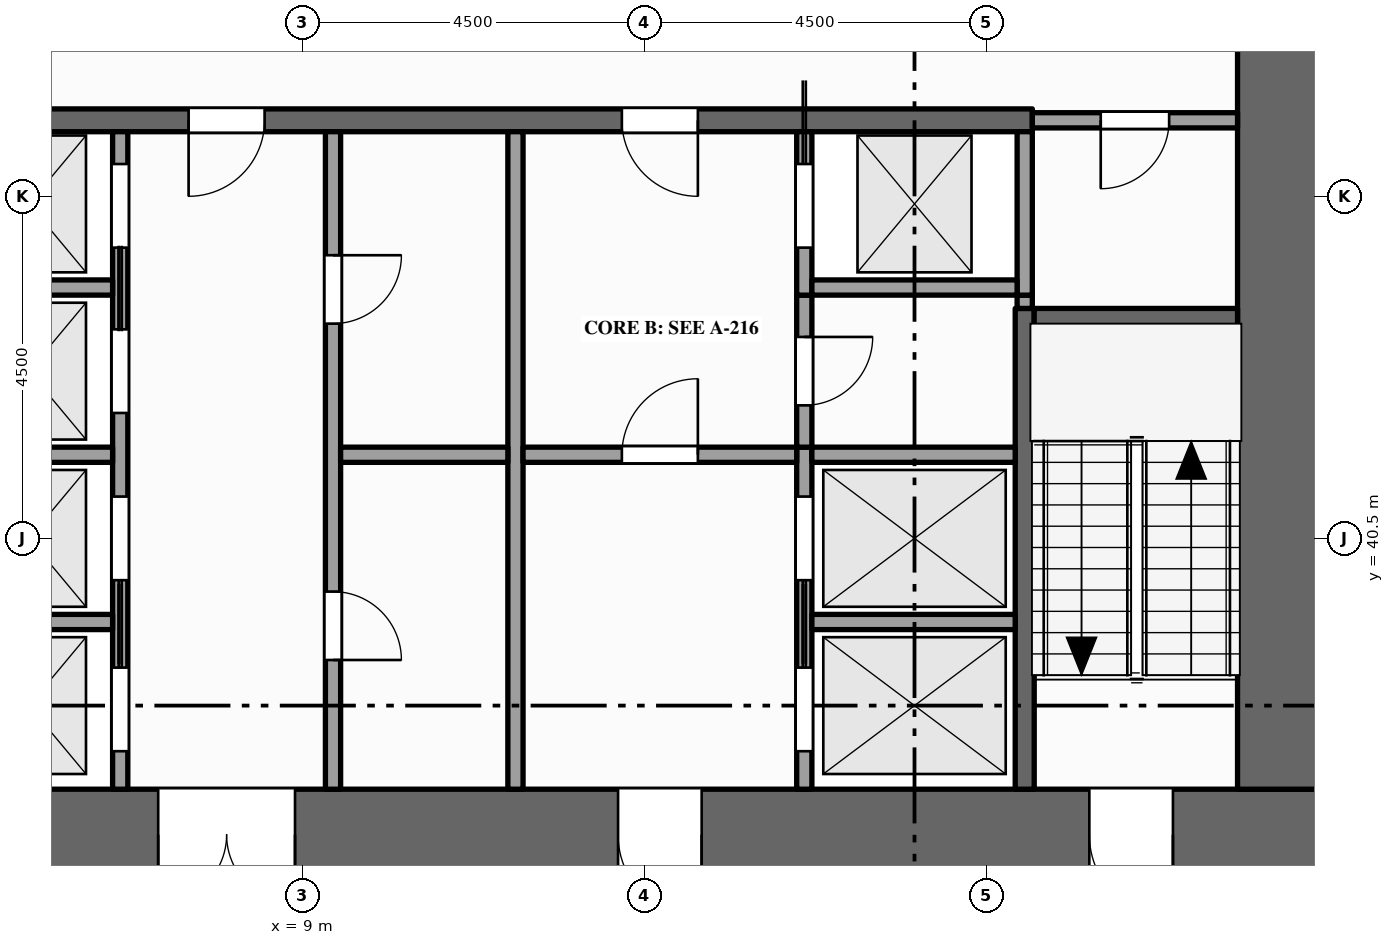
"""IFC4 building model, lengths in metres.
Left out: names, types, materials, properties, quantities, classifications, styles, units other than length and angle.
Written with IfcOpenShell. Run it as: python <this file> out.ifc"""

import sys

from ifc_helpers import new_model, si_unit, direction, frame, frame_2d, origin, place, context, subcontext, project, spatial, rectangle, extrude, element, fill, save


model = new_model("IFC4")
c1 = context("Model", 3, precision=1e-05, world=origin(), true_north=direction((0.0, 1.0)))
c2 = subcontext(c1, "Body", "Model", "MODEL_VIEW")
j1 = project(units=[si_unit("LENGTHUNIT", "METRE"), si_unit("PLANEANGLEUNIT", "RADIAN")], contexts=[c1])
p1 = place(None, origin())
s1 = spatial("IfcSite", under=j1, at=p1, CompositionType="ELEMENT")
p2 = place(p1, origin())
s2 = spatial("IfcBuilding", under=s1, at=p2, CompositionType="ELEMENT")
p3 = place(p2, frame((0.0, 0.0, 83.0)))
s3 = spatial("IfcBuildingStorey", under=s2, at=p3, CompositionType="ELEMENT", Elevation=83.0)
p4 = place(p3, frame((0.0, 36.6, -0.15), z_axis=(0.0, 0.0, 1.0), x_axis=(1.0, 0.0, 0.0)))
e1 = element("IfcWall", 1, at=p4, inside=s3, PredefinedType="SHEAR", context=c2, shape_type="SweptSolid", body=[
    extrude(rectangle(XDim=22.5, YDim=1.2, at=frame_2d((11.25, 0.0))), origin(), (0.0, 0.0, 1.0), 4.0),
])
p5 = place(p4, frame((7.1, 0.0, 0.15)))
e2 = element("IfcOpeningElement", 2, at=p5, cuts=e1, PredefinedType="OPENING", context=c2, shape_type="SweptSolid", body=[
    extrude(rectangle(XDim=1.8, YDim=2.1, at=frame_2d((0.9, 1.05))), frame((0.0, 0.61, 0.0), z_axis=(0.0, -1.0, 0.0), x_axis=(1.0, 0.0, 0.0)), (0.0, 0.0, 1.0), 1.22),
])
p6 = place(p4, frame((13.15, 0.0, 0.15)))
e3 = element("IfcOpeningElement", 3, at=p6, cuts=e1, PredefinedType="OPENING", context=c2, shape_type="SweptSolid", body=[
    extrude(rectangle(XDim=1.1, YDim=2.1, at=frame_2d((0.55, 1.05))), frame((0.0, 0.61, 0.0), z_axis=(0.0, -1.0, 0.0), x_axis=(1.0, 0.0, 0.0)), (0.0, 0.0, 1.0), 1.22),
])
p7 = place(p4, frame((2.15, 0.0, 0.15)))
e4 = element("IfcOpeningElement", 4, at=p7, cuts=e1, PredefinedType="OPENING", context=c2, shape_type="SweptSolid", body=[
    extrude(rectangle(XDim=1.1, YDim=2.1, at=frame_2d((0.55, 1.05))), frame((0.0, 0.61, 0.0), z_axis=(0.0, -1.0, 0.0), x_axis=(1.0, 0.0, 0.0)), (0.0, 0.0, 1.0), 1.22),
])
p8 = place(p4, frame((19.35, 0.0, 0.15)))
e5 = element("IfcOpeningElement", 5, at=p8, cuts=e1, PredefinedType="OPENING", context=c2, shape_type="SweptSolid", body=[
    extrude(rectangle(XDim=1.1, YDim=2.1, at=frame_2d((0.55, 1.05))), frame((0.0, 0.61, 0.0), z_axis=(0.0, -1.0, 0.0), x_axis=(1.0, 0.0, 0.0)), (0.0, 0.0, 1.0), 1.22),
])
p9 = place(p3, frame((21.9, 37.2, -0.15), z_axis=(0.0, 0.0, 1.0), x_axis=(0.0, 1.0, 0.0)))
e6 = element("IfcWall", 6, at=p9, inside=s3, PredefinedType="SHEAR", context=c2, shape_type="SweptSolid", body=[
    extrude(rectangle(XDim=11.1, YDim=1.2, at=frame_2d((5.55, 0.0))), origin(), (0.0, 0.0, 1.0), 4.0),
])
p10 = place(p3, frame((6.6, 37.2, 0.0), z_axis=(0.0, 0.0, 1.0), x_axis=(0.0, 1.0, 0.0)))
e7 = element("IfcWall", 7, at=p10, inside=s3, PredefinedType="SOLIDWALL", context=c2, shape_type="SweptSolid", body=[
    extrude(rectangle(XDim=8.65, YDim=0.2, at=frame_2d((4.325, 0.0))), origin(), (0.0, 0.0, 1.0), 3.85),
])
p11 = place(p10, frame((0.5, 0.0, 0.012)))
e8 = element("IfcOpeningElement", 8, at=p11, cuts=e7, PredefinedType="OPENING", context=c2, shape_type="SweptSolid", body=[
    extrude(rectangle(XDim=1.1, YDim=2.1, at=frame_2d((0.55, 1.05))), frame((0.0, 0.11, 0.0), z_axis=(0.0, -1.0, 0.0), x_axis=(1.0, 0.0, 0.0)), (0.0, 0.0, 1.0), 0.22),
])
p12 = place(p10, frame((2.75, 0.0, 0.012)))
e9 = element("IfcOpeningElement", 9, at=p12, cuts=e7, PredefinedType="OPENING", context=c2, shape_type="SweptSolid", body=[
    extrude(rectangle(XDim=1.1, YDim=2.1, at=frame_2d((0.55, 1.05))), frame((0.0, 0.11, 0.0), z_axis=(0.0, -1.0, 0.0), x_axis=(1.0, 0.0, 0.0)), (0.0, 0.0, 1.0), 0.22),
])
p13 = place(p10, frame((4.95, 0.0, 0.012)))
e10 = element("IfcOpeningElement", 10, at=p13, cuts=e7, PredefinedType="OPENING", context=c2, shape_type="SweptSolid", body=[
    extrude(rectangle(XDim=1.1, YDim=2.1, at=frame_2d((0.55, 1.05))), frame((0.0, 0.11, 0.0), z_axis=(0.0, -1.0, 0.0), x_axis=(1.0, 0.0, 0.0)), (0.0, 0.0, 1.0), 0.22),
])
p14 = place(p10, frame((7.125, 0.0, 0.012)))
e11 = element("IfcOpeningElement", 11, at=p14, cuts=e7, PredefinedType="OPENING", context=c2, shape_type="SweptSolid", body=[
    extrude(rectangle(XDim=1.1, YDim=2.1, at=frame_2d((0.55, 1.05))), frame((0.0, 0.11, 0.0), z_axis=(0.0, -1.0, 0.0), x_axis=(1.0, 0.0, 0.0)), (0.0, 0.0, 1.0), 0.22),
])
p15 = place(p3, frame((9.4, 37.2, 0.0), z_axis=(0.0, 0.0, 1.0), x_axis=(0.0, 1.0, 0.0)))
e12 = element("IfcWall", 12, at=p15, inside=s3, PredefinedType="PARTITIONING", context=c2, shape_type="SweptSolid", body=[
    extrude(rectangle(XDim=8.65, YDim=0.2, at=frame_2d((4.325, 0.0))), origin(), (0.0, 0.0, 1.0), 3.85),
])
p16 = place(p15, frame((1.7, 0.0, 0.0)))
e13 = element("IfcOpeningElement", 13, at=p16, cuts=e12, PredefinedType="OPENING", context=c2, shape_type="SweptSolid", body=[
    extrude(rectangle(XDim=0.9, YDim=2.1, at=frame_2d((0.45, 1.05))), frame((0.0, 0.11, 0.0), z_axis=(0.0, -1.0, 0.0), x_axis=(1.0, 0.0, 0.0)), (0.0, 0.0, 1.0), 0.22),
])
p17 = place(p15, frame((6.125, 0.0, 0.0)))
e14 = element("IfcOpeningElement", 14, at=p17, cuts=e12, PredefinedType="OPENING", context=c2, shape_type="SweptSolid", body=[
    extrude(rectangle(XDim=0.9, YDim=2.1, at=frame_2d((0.45, 1.05))), frame((0.0, 0.11, 0.0), z_axis=(0.0, -1.0, 0.0), x_axis=(1.0, 0.0, 0.0)), (0.0, 0.0, 1.0), 0.22),
])
p18 = place(p3, frame((11.8, 37.2, 0.0), z_axis=(0.0, 0.0, 1.0), x_axis=(0.0, 1.0, 0.0)))
e15 = element("IfcWall", 15, at=p18, inside=s3, PredefinedType="PARTITIONING", context=c2, shape_type="SweptSolid", body=[
    extrude(rectangle(XDim=8.65, YDim=0.2, at=frame_2d((4.325, 0.0))), origin(), (0.0, 0.0, 1.0), 3.85),
])
p19 = place(p3, frame((15.6, 37.2, 0.0), z_axis=(0.0, 0.0, 1.0), x_axis=(0.0, 1.0, 0.0)))
e16 = element("IfcWall", 16, at=p19, inside=s3, PredefinedType="SOLIDWALL", context=c2, shape_type="SweptSolid", body=[
    extrude(rectangle(XDim=4.5, YDim=0.2, at=frame_2d((2.25, 0.0))), origin(), (0.0, 0.0, 1.0), 3.85),
])
p20 = place(p19, frame((0.5, 0.0, 0.012)))
e17 = element("IfcOpeningElement", 17, at=p20, cuts=e16, PredefinedType="OPENING", context=c2, shape_type="SweptSolid", body=[
    extrude(rectangle(XDim=1.1, YDim=2.1, at=frame_2d((0.55, 1.05))), frame((0.0, 0.11, 0.0), z_axis=(0.0, -1.0, 0.0), x_axis=(1.0, 0.0, 0.0)), (0.0, 0.0, 1.0), 0.22),
])
p21 = place(p19, frame((2.75, 0.0, 0.012)))
e18 = element("IfcOpeningElement", 18, at=p21, cuts=e16, PredefinedType="OPENING", context=c2, shape_type="SweptSolid", body=[
    extrude(rectangle(XDim=1.1, YDim=2.1, at=frame_2d((0.55, 1.05))), frame((0.0, 0.11, 0.0), z_axis=(0.0, -1.0, 0.0), x_axis=(1.0, 0.0, 0.0)), (0.0, 0.0, 1.0), 0.22),
])
p22 = place(p3, frame((15.6, 41.7, 0.0), z_axis=(0.0, 0.0, 1.0), x_axis=(0.0, 1.0, 0.0)))
e19 = element("IfcWall", 19, at=p22, inside=s3, PredefinedType="PARTITIONING", context=c2, shape_type="SweptSolid", body=[
    extrude(rectangle(XDim=2.0, YDim=0.2, at=frame_2d((1.0, 0.0))), origin(), (0.0, 0.0, 1.0), 3.85),
])
p23 = place(p22, frame((0.55, 0.0, 0.0)))
e20 = element("IfcOpeningElement", 20, at=p23, cuts=e19, PredefinedType="OPENING", context=c2, shape_type="SweptSolid", body=[
    extrude(rectangle(XDim=0.9, YDim=2.1, at=frame_2d((0.45, 1.05))), frame((0.0, 0.11, 0.0), z_axis=(0.0, -1.0, 0.0), x_axis=(1.0, 0.0, 0.0)), (0.0, 0.0, 1.0), 0.22),
])
p24 = place(p3, frame((15.6, 43.7, 0.0), z_axis=(0.0, 0.0, 1.0), x_axis=(0.0, 1.0, 0.0)))
e21 = element("IfcWall", 21, at=p24, inside=s3, PredefinedType="SOLIDWALL", context=c2, shape_type="SweptSolid", body=[
    extrude(rectangle(XDim=2.15, YDim=0.2, at=frame_2d((1.075, 0.0))), origin(), (0.0, 0.0, 1.0), 3.85),
])
p25 = place(p24, frame((0.625, 0.0, 0.012)))
e22 = element("IfcOpeningElement", 22, at=p25, cuts=e21, PredefinedType="OPENING", context=c2, shape_type="SweptSolid", body=[
    extrude(rectangle(XDim=1.1, YDim=2.1, at=frame_2d((0.55, 1.05))), frame((0.0, 0.11, 0.0), z_axis=(0.0, -1.0, 0.0), x_axis=(1.0, 0.0, 0.0)), (0.0, 0.0, 1.0), 0.22),
])
p26 = place(p3, frame((18.5, 37.2, 0.0), z_axis=(0.0, 0.0, 1.0), x_axis=(0.0, 1.0, 0.0)))
e23 = element("IfcWall", 23, at=p26, inside=s3, PredefinedType="SHEAR", context=c2, shape_type="SweptSolid", body=[
    extrude(rectangle(XDim=6.325, YDim=0.25, at=frame_2d((3.163, 0.0))), origin(), (0.0, 0.0, 1.0), 3.85),
])
p27 = place(p3, frame((18.5, 43.525, 0.0), z_axis=(0.0, 0.0, 1.0), x_axis=(0.0, 1.0, 0.0)))
e24 = element("IfcWall", 24, at=p27, inside=s3, PredefinedType="PARTITIONING", context=c2, shape_type="SweptSolid", body=[
    extrude(rectangle(XDim=0.175, YDim=0.2, at=frame_2d((0.087, 0.0))), origin(), (0.0, 0.0, 1.0), 3.85),
])
p28 = place(p3, frame((18.5, 43.7, 0.0), z_axis=(0.0, 0.0, 1.0), x_axis=(0.0, 1.0, 0.0)))
e25 = element("IfcWall", 25, at=p28, inside=s3, PredefinedType="SOLIDWALL", context=c2, shape_type="SweptSolid", body=[
    extrude(rectangle(XDim=2.15, YDim=0.2, at=frame_2d((1.075, 0.0))), origin(), (0.0, 0.0, 1.0), 3.85),
])
p29 = place(p3, frame((4.325, 39.4, 0.0), z_axis=(0.0, 0.0, 1.0), x_axis=(1.0, 0.0, 0.0)))
e26 = element("IfcWall", 26, at=p29, inside=s3, PredefinedType="SOLIDWALL", context=c2, shape_type="SweptSolid", body=[
    extrude(rectangle(XDim=2.175, YDim=0.2, at=frame_2d((1.087, 0.0))), origin(), (0.0, 0.0, 1.0), 3.85),
])
p30 = place(p3, frame((15.7, 39.4, 0.0), z_axis=(0.0, 0.0, 1.0), x_axis=(1.0, 0.0, 0.0)))
e27 = element("IfcWall", 27, at=p30, inside=s3, PredefinedType="SOLIDWALL", context=c2, shape_type="SweptSolid", body=[
    extrude(rectangle(XDim=2.675, YDim=0.2, at=frame_2d((1.337, 0.0))), origin(), (0.0, 0.0, 1.0), 3.85),
])
p31 = place(p3, frame((4.325, 41.6, 0.0), z_axis=(0.0, 0.0, 1.0), x_axis=(1.0, 0.0, 0.0)))
e28 = element("IfcWall", 28, at=p31, inside=s3, PredefinedType="SOLIDWALL", context=c2, shape_type="SweptSolid", body=[
    extrude(rectangle(XDim=2.175, YDim=0.2, at=frame_2d((1.087, 0.0))), origin(), (0.0, 0.0, 1.0), 3.85),
])
p32 = place(p3, frame((9.5, 41.6, 0.0), z_axis=(0.0, 0.0, 1.0), x_axis=(1.0, 0.0, 0.0)))
e29 = element("IfcWall", 29, at=p32, inside=s3, PredefinedType="PARTITIONING", context=c2, shape_type="SweptSolid", body=[
    extrude(rectangle(XDim=2.2, YDim=0.2, at=frame_2d((1.1, 0.0))), origin(), (0.0, 0.0, 1.0), 3.85),
])
p33 = place(p3, frame((11.9, 41.6, 0.0), z_axis=(0.0, 0.0, 1.0), x_axis=(1.0, 0.0, 0.0)))
e30 = element("IfcWall", 30, at=p33, inside=s3, PredefinedType="PARTITIONING", context=c2, shape_type="SweptSolid", body=[
    extrude(rectangle(XDim=3.6, YDim=0.2, at=frame_2d((1.8, 0.0))), origin(), (0.0, 0.0, 1.0), 3.85),
])
p34 = place(p33, frame((1.3, 0.0, 0.0)))
e31 = element("IfcOpeningElement", 31, at=p34, cuts=e30, PredefinedType="OPENING", context=c2, shape_type="SweptSolid", body=[
    extrude(rectangle(XDim=1.0, YDim=2.1, at=frame_2d((0.5, 1.05))), frame((0.0, 0.11, 0.0), z_axis=(0.0, -1.0, 0.0), x_axis=(1.0, 0.0, 0.0)), (0.0, 0.0, 1.0), 0.22),
])
p35 = place(p3, frame((15.7, 41.6, 0.0), z_axis=(0.0, 0.0, 1.0), x_axis=(1.0, 0.0, 0.0)))
e32 = element("IfcWall", 32, at=p35, inside=s3, PredefinedType="SOLIDWALL", context=c2, shape_type="SweptSolid", body=[
    extrude(rectangle(XDim=2.675, YDim=0.2, at=frame_2d((1.337, 0.0))), origin(), (0.0, 0.0, 1.0), 3.85),
])
p36 = place(p3, frame((18.625, 43.4, 0.0), z_axis=(0.0, 0.0, 1.0), x_axis=(1.0, 0.0, 0.0)))
e33 = element("IfcWall", 33, at=p36, inside=s3, PredefinedType="SHEAR", context=c2, shape_type="SweptSolid", body=[
    extrude(rectangle(XDim=2.675, YDim=0.25, at=frame_2d((1.337, 0.0))), origin(), (0.0, 0.0, 1.0), 3.85),
])
p37 = place(p3, frame((4.3, 43.8, 0.0), z_axis=(0.0, 0.0, 1.0), x_axis=(1.0, 0.0, 0.0)))
e34 = element("IfcWall", 34, at=p37, inside=s3, PredefinedType="SOLIDWALL", context=c2, shape_type="SweptSolid", body=[
    extrude(rectangle(XDim=2.2, YDim=0.2, at=frame_2d((1.1, 0.0))), origin(), (0.0, 0.0, 1.0), 3.85),
])
p38 = place(p3, frame((15.7, 43.8, 0.0), z_axis=(0.0, 0.0, 1.0), x_axis=(1.0, 0.0, 0.0)))
e35 = element("IfcWall", 35, at=p38, inside=s3, PredefinedType="SOLIDWALL", context=c2, shape_type="SweptSolid", body=[
    extrude(rectangle(XDim=2.7, YDim=0.2, at=frame_2d((1.35, 0.0))), origin(), (0.0, 0.0, 1.0), 3.85),
])
p39 = place(p3, frame((4.1, 46.0, 0.0), z_axis=(0.0, 0.0, 1.0), x_axis=(1.0, 0.0, 0.0)))
e36 = element("IfcWall", 36, at=p39, inside=s3, PredefinedType="SHEAR", context=c2, shape_type="SweptSolid", body=[
    extrude(rectangle(XDim=14.5, YDim=0.3, at=frame_2d((7.25, 0.0))), origin(), (0.0, 0.0, 1.0), 3.85),
])
p40 = place(p39, frame((3.4, 0.0, 0.0)))
e37 = element("IfcOpeningElement", 37, at=p40, cuts=e36, PredefinedType="OPENING", context=c2, shape_type="SweptSolid", body=[
    extrude(rectangle(XDim=1.0, YDim=2.1, at=frame_2d((0.5, 1.05))), frame((0.0, 0.16, 0.0), z_axis=(0.0, -1.0, 0.0), x_axis=(1.0, 0.0, 0.0)), (0.0, 0.0, 1.0), 0.32),
])
p41 = place(p39, frame((9.1, 0.0, 0.0)))
e38 = element("IfcOpeningElement", 38, at=p41, cuts=e36, PredefinedType="OPENING", context=c2, shape_type="SweptSolid", body=[
    extrude(rectangle(XDim=1.0, YDim=2.1, at=frame_2d((0.5, 1.05))), frame((0.0, 0.16, 0.0), z_axis=(0.0, -1.0, 0.0), x_axis=(1.0, 0.0, 0.0)), (0.0, 0.0, 1.0), 0.32),
])
p42 = place(p3, frame((18.6, 46.0, 0.0), z_axis=(0.0, 0.0, 1.0), x_axis=(1.0, 0.0, 0.0)))
e39 = element("IfcWall", 39, at=p42, inside=s3, PredefinedType="PARTITIONING", context=c2, shape_type="SweptSolid", body=[
    extrude(rectangle(XDim=2.7, YDim=0.2, at=frame_2d((1.35, 0.0))), origin(), (0.0, 0.0, 1.0), 3.85),
])
p43 = place(p42, frame((0.9, 0.0, 0.0)))
e40 = element("IfcOpeningElement", 40, at=p43, cuts=e39, PredefinedType="OPENING", context=c2, shape_type="SweptSolid", body=[
    extrude(rectangle(XDim=0.9, YDim=2.1, at=frame_2d((0.45, 1.05))), frame((0.0, 0.11, 0.0), z_axis=(0.0, -1.0, 0.0), x_axis=(1.0, 0.0, 0.0)), (0.0, 0.0, 1.0), 0.22),
])
p44 = place(p11, origin())
e41 = element("IfcDoor", 41, at=p44, inside=s3, OperationType="SLIDING_TO_RIGHT", PredefinedType="DOOR", context=c2, shape_type="SweptSolid", body=[
    extrude(rectangle(XDim=1.1, YDim=2.1, at=frame_2d((0.55, 1.05))), frame((0.0, 0.025, 0.0), z_axis=(0.0, -1.0, 0.0), x_axis=(1.0, 0.0, 0.0)), (0.0, 0.0, 1.0), 0.05),
])
fill(e8, e41)
p45 = place(p12, origin())
e42 = element("IfcDoor", 42, at=p45, inside=s3, OperationType="SLIDING_TO_LEFT", PredefinedType="DOOR", context=c2, shape_type="SweptSolid", body=[
    extrude(rectangle(XDim=1.1, YDim=2.1, at=frame_2d((0.55, 1.05))), frame((0.0, 0.025, 0.0), z_axis=(0.0, -1.0, 0.0), x_axis=(1.0, 0.0, 0.0)), (0.0, 0.0, 1.0), 0.05),
])
fill(e9, e42)
p46 = place(p13, origin())
e43 = element("IfcDoor", 43, at=p46, inside=s3, OperationType="SLIDING_TO_RIGHT", PredefinedType="DOOR", context=c2, shape_type="SweptSolid", body=[
    extrude(rectangle(XDim=1.1, YDim=2.1, at=frame_2d((0.55, 1.05))), frame((0.0, 0.025, 0.0), z_axis=(0.0, -1.0, 0.0), x_axis=(1.0, 0.0, 0.0)), (0.0, 0.0, 1.0), 0.05),
])
fill(e10, e43)
p47 = place(p14, origin())
e44 = element("IfcDoor", 44, at=p47, inside=s3, OperationType="SLIDING_TO_LEFT", PredefinedType="DOOR", context=c2, shape_type="SweptSolid", body=[
    extrude(rectangle(XDim=1.1, YDim=2.1, at=frame_2d((0.55, 1.05))), frame((0.0, 0.025, 0.0), z_axis=(0.0, -1.0, 0.0), x_axis=(1.0, 0.0, 0.0)), (0.0, 0.0, 1.0), 0.05),
])
fill(e11, e44)
p48 = place(p20, origin())
e45 = element("IfcDoor", 45, at=p48, inside=s3, OperationType="SLIDING_TO_RIGHT", PredefinedType="DOOR", context=c2, shape_type="SweptSolid", body=[
    extrude(rectangle(XDim=1.1, YDim=2.1, at=frame_2d((0.55, 1.05))), frame((0.0, 0.025, 0.0), z_axis=(0.0, -1.0, 0.0), x_axis=(1.0, 0.0, 0.0)), (0.0, 0.0, 1.0), 0.05),
])
fill(e17, e45)
p49 = place(p21, origin())
e46 = element("IfcDoor", 46, at=p49, inside=s3, OperationType="SLIDING_TO_LEFT", PredefinedType="DOOR", context=c2, shape_type="SweptSolid", body=[
    extrude(rectangle(XDim=1.1, YDim=2.1, at=frame_2d((0.55, 1.05))), frame((0.0, 0.025, 0.0), z_axis=(0.0, -1.0, 0.0), x_axis=(1.0, 0.0, 0.0)), (0.0, 0.0, 1.0), 0.05),
])
fill(e18, e46)
p50 = place(p25, origin())
e47 = element("IfcDoor", 47, at=p50, inside=s3, OperationType="SLIDING_TO_RIGHT", PredefinedType="DOOR", context=c2, shape_type="SweptSolid", body=[
    extrude(rectangle(XDim=1.1, YDim=2.1, at=frame_2d((0.55, 1.05))), frame((0.0, 0.025, 0.0), z_axis=(0.0, -1.0, 0.0), x_axis=(1.0, 0.0, 0.0)), (0.0, 0.0, 1.0), 0.05),
])
fill(e22, e47)
p51 = place(p5, origin())
e48 = element("IfcDoor", 48, at=p51, inside=s3, OperationType="DOUBLE_DOOR_SINGLE_SWING", PredefinedType="DOOR", context=c2, shape_type="SweptSolid", body=[
    extrude(rectangle(XDim=1.8, YDim=2.1, at=frame_2d((0.9, 1.05))), frame((0.0, 0.025, 0.0), z_axis=(0.0, -1.0, 0.0), x_axis=(1.0, 0.0, 0.0)), (0.0, 0.0, 1.0), 0.05),
])
fill(e2, e48)
p52 = place(p40, origin())
e49 = element("IfcDoor", 49, at=p52, inside=s3, OperationType="SINGLE_SWING_LEFT", PredefinedType="DOOR", context=c2, shape_type="SweptSolid", body=[
    extrude(rectangle(XDim=1.0, YDim=2.1, at=frame_2d((0.5, 1.05))), frame((0.0, 0.025, 0.0), z_axis=(0.0, -1.0, 0.0), x_axis=(1.0, 0.0, 0.0)), (0.0, 0.0, 1.0), 0.05),
])
fill(e37, e49)
p53 = place(p6, origin())
e50 = element("IfcDoor", 50, at=p53, inside=s3, OperationType="SINGLE_SWING_RIGHT", PredefinedType="DOOR", context=c2, shape_type="SweptSolid", body=[
    extrude(rectangle(XDim=1.1, YDim=2.1, at=frame_2d((0.55, 1.05))), frame((0.0, 0.025, 0.0), z_axis=(0.0, -1.0, 0.0), x_axis=(1.0, 0.0, 0.0)), (0.0, 0.0, 1.0), 0.05),
])
fill(e3, e50)
p54 = place(p34, origin())
e51 = element("IfcDoor", 51, at=p54, inside=s3, OperationType="SINGLE_SWING_RIGHT", PredefinedType="DOOR", context=c2, shape_type="SweptSolid", body=[
    extrude(rectangle(XDim=1.0, YDim=2.1, at=frame_2d((0.5, 1.05))), frame((0.0, 0.025, 0.0), z_axis=(0.0, -1.0, 0.0), x_axis=(1.0, 0.0, 0.0)), (0.0, 0.0, 1.0), 0.05),
])
fill(e31, e51)
p55 = place(p41, origin())
e52 = element("IfcDoor", 52, at=p55, inside=s3, OperationType="SINGLE_SWING_RIGHT", PredefinedType="DOOR", context=c2, shape_type="SweptSolid", body=[
    extrude(rectangle(XDim=1.0, YDim=2.1, at=frame_2d((0.5, 1.05))), frame((0.0, 0.025, 0.0), z_axis=(0.0, -1.0, 0.0), x_axis=(1.0, 0.0, 0.0)), (0.0, 0.0, 1.0), 0.05),
])
fill(e38, e52)
p56 = place(p8, origin())
e53 = element("IfcDoor", 53, at=p56, inside=s3, OperationType="SINGLE_SWING_RIGHT", PredefinedType="DOOR", context=c2, shape_type="SweptSolid", body=[
    extrude(rectangle(XDim=1.1, YDim=2.1, at=frame_2d((0.55, 1.05))), frame((0.0, 0.025, 0.0), z_axis=(0.0, -1.0, 0.0), x_axis=(1.0, 0.0, 0.0)), (0.0, 0.0, 1.0), 0.05),
])
fill(e5, e53)
p57 = place(p43, origin())
e54 = element("IfcDoor", 54, at=p57, inside=s3, OperationType="SINGLE_SWING_LEFT", PredefinedType="DOOR", context=c2, shape_type="SweptSolid", body=[
    extrude(rectangle(XDim=0.9, YDim=2.1, at=frame_2d((0.45, 1.05))), frame((0.0, 0.025, 0.0), z_axis=(0.0, -1.0, 0.0), x_axis=(1.0, 0.0, 0.0)), (0.0, 0.0, 1.0), 0.05),
])
fill(e40, e54)
p58 = place(p16, origin())
e55 = element("IfcDoor", 55, at=p58, inside=s3, OperationType="SINGLE_SWING_LEFT", PredefinedType="DOOR", context=c2, shape_type="SweptSolid", body=[
    extrude(rectangle(XDim=0.9, YDim=2.1, at=frame_2d((0.45, 1.05))), frame((0.0, 0.025, 0.0), z_axis=(0.0, -1.0, 0.0), x_axis=(1.0, 0.0, 0.0)), (0.0, 0.0, 1.0), 0.05),
])
fill(e13, e55)
p59 = place(p17, origin())
e56 = element("IfcDoor", 56, at=p59, inside=s3, OperationType="SINGLE_SWING_RIGHT", PredefinedType="DOOR", context=c2, shape_type="SweptSolid", body=[
    extrude(rectangle(XDim=0.9, YDim=2.1, at=frame_2d((0.45, 1.05))), frame((0.0, 0.025, 0.0), z_axis=(0.0, -1.0, 0.0), x_axis=(1.0, 0.0, 0.0)), (0.0, 0.0, 1.0), 0.05),
])
fill(e14, e56)
p60 = place(p23, origin())
e57 = element("IfcDoor", 57, at=p60, inside=s3, OperationType="SINGLE_SWING_RIGHT", PredefinedType="DOOR", context=c2, shape_type="SweptSolid", body=[
    extrude(rectangle(XDim=0.9, YDim=2.1, at=frame_2d((0.45, 1.05))), frame((0.0, 0.025, 0.0), z_axis=(0.0, -1.0, 0.0), x_axis=(1.0, 0.0, 0.0)), (0.0, 0.0, 1.0), 0.05),
])
fill(e20, e57)
save(model, sys.argv[1])
